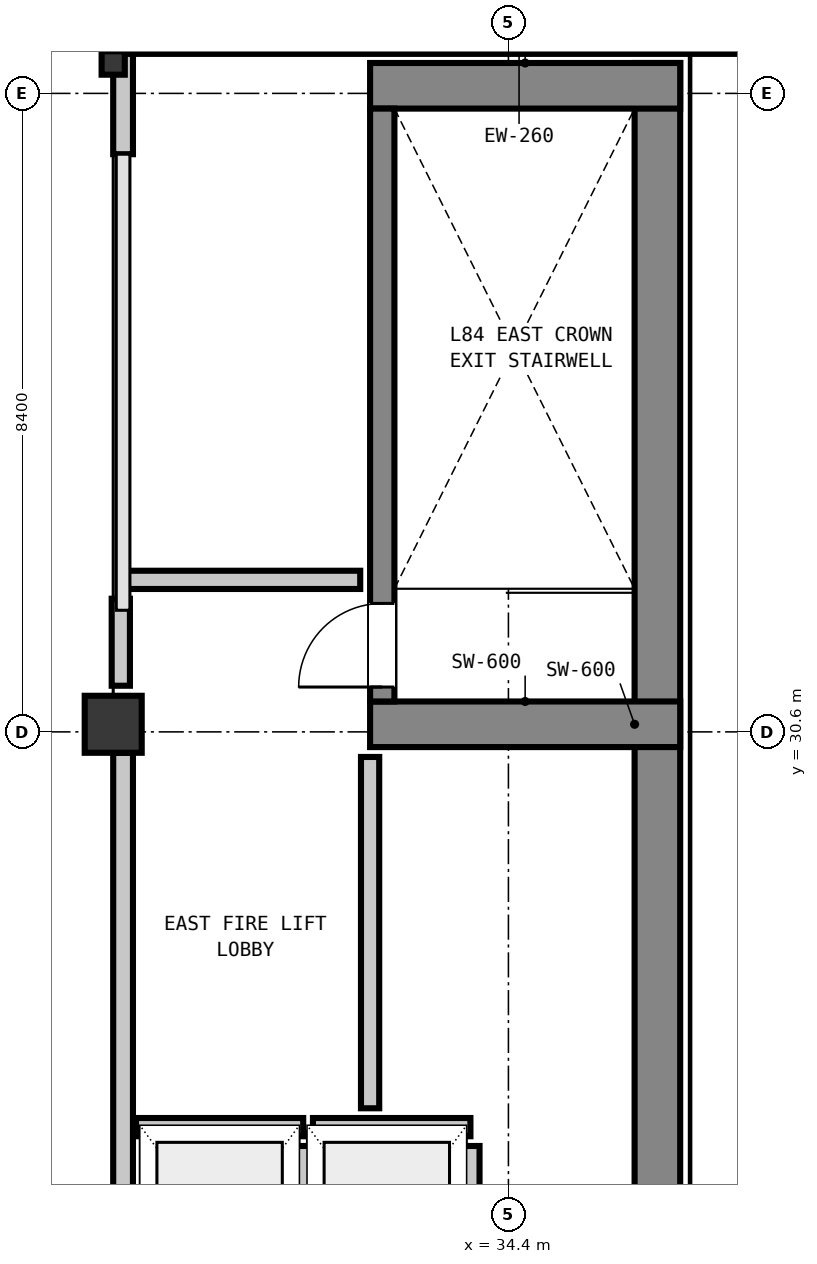
"""IFC4 building model, lengths in metres.
Left out: names, types, materials, properties, quantities, classifications, styles, units other than length and angle.
Written with IfcOpenShell. Run it as: python <this file> out.ifc"""

import sys

from ifc_helpers import new_model, si_unit, direction, frame, frame_2d, origin, origin_2d, place, context, subcontext, project, spatial, rectangle, i_section, extrude, element, fill, save


model = new_model("IFC4")
c1 = context("Model", 3, precision=1e-05, world=origin(), true_north=direction((0.0, 1.0)))
c2 = subcontext(c1, "Body", "Model", "MODEL_VIEW")
j1 = project(units=[si_unit("LENGTHUNIT", "METRE"), si_unit("PLANEANGLEUNIT", "RADIAN")], contexts=[c1])
p1 = place(None, origin())
s1 = spatial("IfcSite", under=j1, at=p1, CompositionType="ELEMENT")
p2 = place(p1, origin())
s2 = spatial("IfcBuilding", under=s1, at=p2, CompositionType="ELEMENT")
p3 = place(p2, frame((0.0, 0.0, 297.68)))
s3 = spatial("IfcBuildingStorey", under=s2, at=p3, CompositionType="ELEMENT", Elevation=297.68)
p4 = place(p3, frame((36.36, 22.0, 0.0), z_axis=(0.0, 0.0, 1.0), x_axis=(0.0, 1.0, 0.0)))
e1 = element("IfcWall", 1, at=p4, inside=s3, PredefinedType="SHEAR", context=c2, shape_type="SweptSolid", body=[
    extrude(rectangle(XDim=17.4, YDim=0.6, at=frame_2d((8.7, 0.0))), origin(), (0.0, 0.0, 1.0), 4.9),
])
for number, where, z_axis, x_axis in (
    (2, (32.58, 39.1, 0.0), (0.0, 0.0, 1.0), (1.0, 0.0, 0.0)),
    (3, (32.58, 30.7, 0.0), (0.0, 0.0, 1.0), (1.0, 0.0, 0.0)),
):
    element("IfcWall", number, at=place(p3, frame(where, z_axis=z_axis, x_axis=x_axis)), inside=s3, PredefinedType="SHEAR", context=c2, shape_type="SweptSolid", body=[
        extrude(rectangle(XDim=4.08, YDim=0.6, at=frame_2d((2.04, 0.0))), origin(), (0.0, 0.0, 1.0), 4.9),
    ])
p5 = place(p3, frame((32.74, 31.0, 0.0), z_axis=(0.0, 0.0, 1.0), x_axis=(0.0, 1.0, 0.0)))
e4 = element("IfcWall", 4, at=p5, inside=s3, PredefinedType="SHEAR", context=c2, shape_type="SweptSolid", body=[
    extrude(rectangle(XDim=7.8, YDim=0.32, at=frame_2d((3.9, 0.0))), origin(), (0.0, 0.0, 1.0), 4.9),
])
p6 = place(p5, frame((0.19, 0.0, 0.0)))
e5 = element("IfcOpeningElement", 5, at=p6, cuts=e4, PredefinedType="OPENING", context=c2, shape_type="SweptSolid", body=[
    extrude(rectangle(XDim=1.1, YDim=2.15, at=frame_2d((0.55, 1.075))), frame((0.0, 0.17, 0.0), z_axis=(0.0, -1.0, 0.0), x_axis=(1.0, 0.0, 0.0)), (0.0, 0.0, 1.0), 0.34),
])
p7 = place(p3, frame((29.2, 30.7, 0.0), z_axis=(0.0, 0.0, 1.0), x_axis=(1.0, 0.0, 0.0)))
e6 = element("IfcColumn", 6, at=p7, inside=s3, PredefinedType="COLUMN", context=c2, shape_type="SweptSolid", body=[
    extrude(rectangle(XDim=0.75, YDim=0.75, at=origin_2d()), origin(), (0.0, 0.0, 1.0), 4.9),
])
p8 = place(p3, frame((29.2, 39.4, 0.0), z_axis=(0.0, 0.0, 1.0), x_axis=(1.0, 0.0, 0.0)))
e7 = element("IfcColumn", 7, at=p8, inside=s3, PredefinedType="COLUMN", context=c2, shape_type="SweptSolid", body=[
    extrude(i_section(OverallWidth=0.305, OverallDepth=0.308, WebThickness=0.01, FlangeThickness=0.015, at=origin_2d()), origin(), (0.0, 0.0, 1.0), 4.9),
])
p9 = place(p3, frame((29.33, 39.65, 0.0), z_axis=(0.0, 0.0, 1.0), x_axis=(1.0, 0.0, 0.0)))
e8 = element("IfcWall", 8, at=p9, inside=s3, PredefinedType="STANDARD", context=c2, shape_type="SweptSolid", body=[
    extrude(rectangle(XDim=10.42, YDim=0.26, at=frame_2d((5.21, 0.0))), origin(), (0.0, 0.0, 1.0), 4.034),
])
p10 = place(p3, frame((29.33, 22.3, 0.0), z_axis=(0.0, 0.0, 1.0), x_axis=(0.0, 1.0, 0.0)))
e9 = element("IfcWall", 9, at=p10, inside=s3, PredefinedType="STANDARD", context=c2, shape_type="SweptSolid", body=[
    extrude(rectangle(XDim=8.025, YDim=0.26, at=frame_2d((4.012, 0.0))), origin(), (0.0, 0.0, 1.0), 4.034),
])
p11 = place(p3, frame((29.33, 38.2, 0.0), z_axis=(0.0, 0.0, 1.0), x_axis=(0.0, 1.0, 0.0)))
e10 = element("IfcWall", 10, at=p11, inside=s3, PredefinedType="STANDARD", context=c2, shape_type="SweptSolid", body=[
    extrude(rectangle(XDim=1.32, YDim=0.26, at=frame_2d((0.66, 0.0))), origin(), (0.0, 0.0, 1.0), 4.192),
])
p12 = place(p3, frame((29.5, 25.4, 0.0), z_axis=(0.0, 0.0, 1.0), x_axis=(1.0, 0.0, 0.0)))
e11 = element("IfcWall", 11, at=p12, inside=s3, PredefinedType="PARTITIONING", context=c2, shape_type="SweptSolid", body=[
    extrude(rectangle(XDim=2.2, YDim=0.24, at=frame_2d((1.1, 0.0))), origin(), (0.0, 0.0, 1.0), 4.56),
])
p13 = place(p3, frame((31.7, 22.848, 0.0), z_axis=(0.0, 0.0, 1.0), x_axis=(0.0, 1.0, 0.0)))
e12 = element("IfcWall", 12, at=p13, inside=s3, PredefinedType="PARTITIONING", context=c2, shape_type="SweptSolid", body=[
    extrude(rectangle(XDim=2.304, YDim=0.24, at=frame_2d((1.152, 0.0))), origin(), (0.0, 0.0, 1.0), 4.56),
])
p14 = place(p3, frame((31.828, 25.4, 0.0), z_axis=(0.0, 0.0, 1.0), x_axis=(1.0, 0.0, 0.0)))
e13 = element("IfcWall", 13, at=p14, inside=s3, PredefinedType="PARTITIONING", context=c2, shape_type="SweptSolid", body=[
    extrude(rectangle(XDim=2.072, YDim=0.24, at=frame_2d((1.036, 0.0))), origin(), (0.0, 0.0, 1.0), 4.56),
])
p15 = place(p3, frame((33.9, 22.848, 0.0), z_axis=(0.0, 0.0, 1.0), x_axis=(0.0, 1.0, 0.0)))
e14 = element("IfcWall", 14, at=p15, inside=s3, PredefinedType="PARTITIONING", context=c2, shape_type="SweptSolid", body=[
    extrude(rectangle(XDim=2.304, YDim=0.24, at=frame_2d((1.152, 0.0))), origin(), (0.0, 0.0, 1.0), 4.56),
])
p16 = place(p3, frame((29.3, 32.6, 0.0), z_axis=(0.0, 0.0, 1.0), x_axis=(1.0, 0.0, 0.0)))
e15 = element("IfcWall", 15, at=p16, inside=s3, PredefinedType="PARTITIONING", context=c2, shape_type="SweptSolid", body=[
    extrude(rectangle(XDim=3.15, YDim=0.24, at=frame_2d((1.575, 0.0))), origin(), (0.0, 0.0, 1.0), 4.56),
])
p17 = place(p3, frame((29.3, 31.207, 0.0), z_axis=(0.0, 0.0, 1.0), x_axis=(0.0, 1.0, 0.0)))
e16 = element("IfcWall", 16, at=p17, inside=s3, PredefinedType="PARTITIONING", context=c2, shape_type="SweptSolid", body=[
    extrude(rectangle(XDim=1.145, YDim=0.24, at=frame_2d((0.573, 0.0))), origin(), (0.0, 0.0, 1.0), 4.192),
])
p18 = place(p3, frame((32.58, 25.648, 0.0), z_axis=(0.0, 0.0, 1.0), x_axis=(0.0, 1.0, 0.0)))
e17 = element("IfcWall", 17, at=p18, inside=s3, PredefinedType="PARTITIONING", context=c2, shape_type="SweptSolid", body=[
    extrude(rectangle(XDim=4.622, YDim=0.24, at=frame_2d((2.311, 0.0))), origin(), (0.0, 0.0, 1.0), 4.56),
])
p19 = place(p6, origin())
e18 = element("IfcDoor", 18, at=p19, inside=s3, OperationType="SINGLE_SWING_LEFT", PredefinedType="DOOR", context=c2, shape_type="SweptSolid", body=[
    extrude(rectangle(XDim=1.1, YDim=2.15, at=frame_2d((0.55, 1.075))), frame((0.0, 0.025, 0.0), z_axis=(0.0, -1.0, 0.0), x_axis=(1.0, 0.0, 0.0)), (0.0, 0.0, 1.0), 0.05),
])
fill(e5, e18)
save(model, sys.argv[1])
